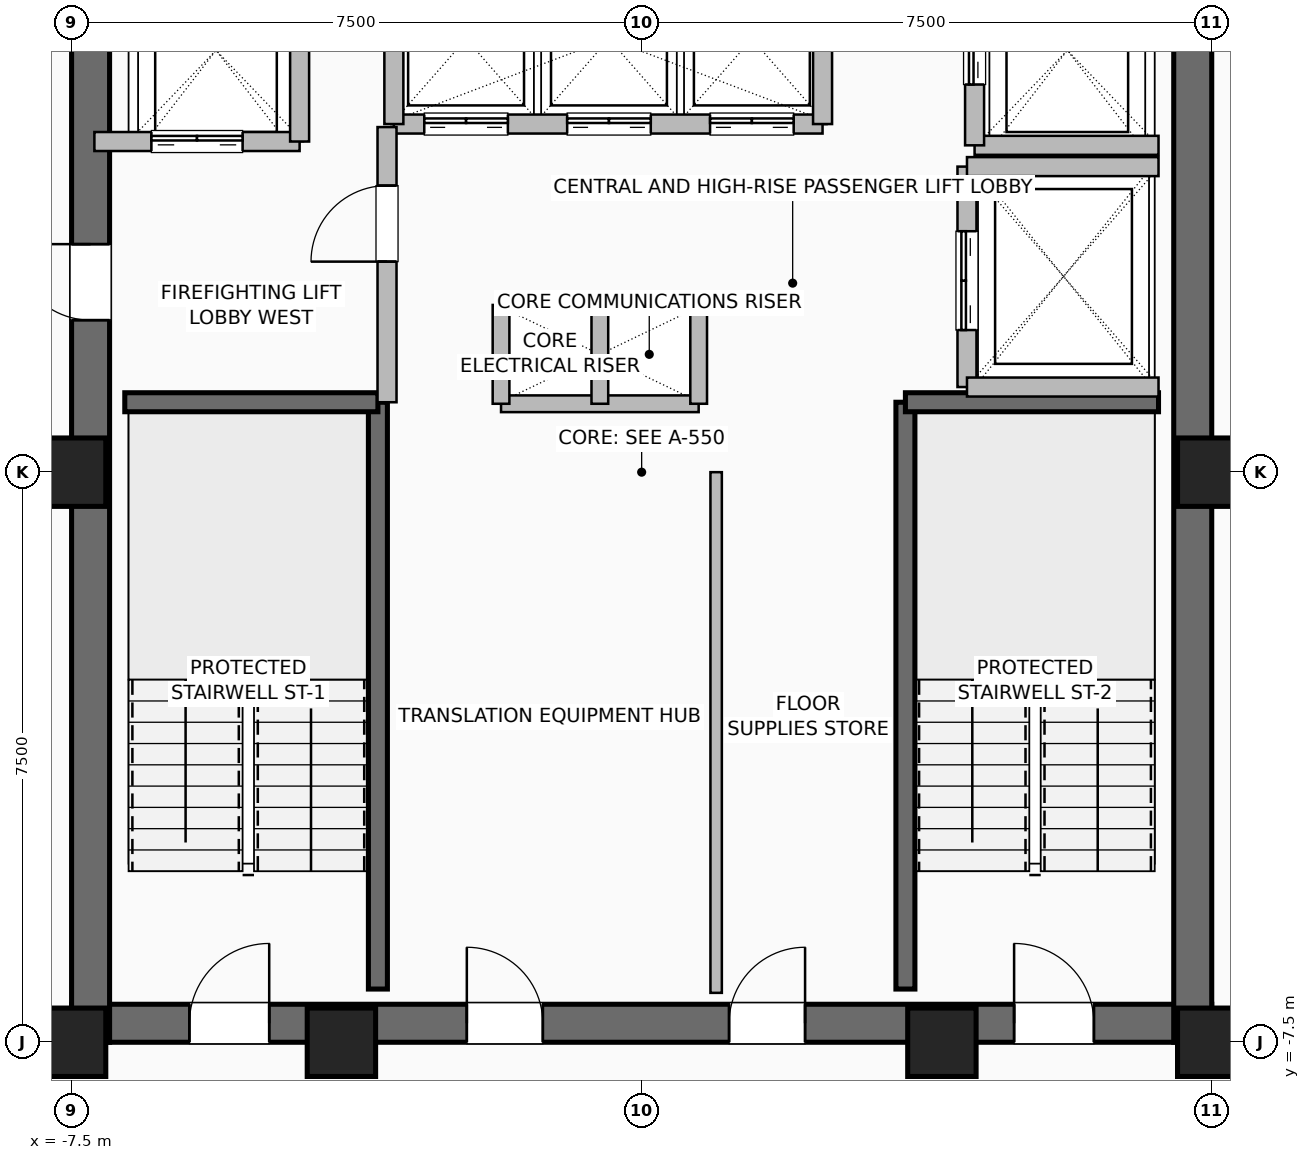
"""IFC4 building model, lengths in metres.
Left out: names, types, materials, properties, quantities, classifications, styles, units other than length and angle.
Written with IfcOpenShell. Run it as: python <this file> out.ifc"""

import sys

from ifc_helpers import new_model, si_unit, direction, frame, frame_2d, origin, origin_2d, place, context, subcontext, project, spatial, rectangle, hollow_rectangle, extrude, element, fill, save


model = new_model("IFC4")
c1 = context("Model", 3, precision=1e-05, world=origin(), true_north=direction((0.0, 1.0)))
c2 = subcontext(c1, "Body", "Model", "MODEL_VIEW")
j1 = project(units=[si_unit("LENGTHUNIT", "METRE"), si_unit("PLANEANGLEUNIT", "RADIAN")], contexts=[c1])
p1 = place(None, origin())
s1 = spatial("IfcSite", under=j1, at=p1, CompositionType="ELEMENT")
p2 = place(p1, origin())
s2 = spatial("IfcBuilding", under=s1, at=p2, CompositionType="ELEMENT")
p3 = place(p2, frame((0.0, 0.0, 195.0)))
s3 = spatial("IfcBuildingStorey", under=s2, at=p3, CompositionType="ELEMENT", Elevation=195.0)
for number, where, z_axis, x_axis in (
    (1, (-7.5, -7.5, 0.0), (0.0, 0.0, 1.0), (1.0, 0.0, 0.0)),
    (2, (-3.95, -7.5, 0.0), (0.0, 0.0, 1.0), (1.0, 0.0, 0.0)),
    (3, (3.95, -7.5, 0.0), (0.0, 0.0, 1.0), (1.0, 0.0, 0.0)),
    (4, (7.5, -7.5, 0.0), (0.0, 0.0, 1.0), (1.0, 0.0, 0.0)),
    (5, (7.5, 0.0, 0.0), (0.0, 0.0, 1.0), (1.0, 0.0, 0.0)),
    (6, (-7.5, 0.0, 0.0), (0.0, 0.0, 1.0), (1.0, 0.0, 0.0)),
):
    element("IfcColumn", number, at=place(p3, frame(where, z_axis=z_axis, x_axis=x_axis)), inside=s3, PredefinedType="COLUMN", context=c2, shape_type="SweptSolid", body=[
        extrude(hollow_rectangle(XDim=0.9, YDim=0.9, WallThickness=0.045, at=origin_2d()), origin(), (0.0, 0.0, 1.0), 3.6),
    ])
p4 = place(p3, frame((-7.5, -7.25, 0.0), z_axis=(0.0, 0.0, 1.0), x_axis=(1.0, 0.0, 0.0)))
e7 = element("IfcWall", 7, at=p4, inside=s3, PredefinedType="SHEAR", context=c2, shape_type="SweptSolid", body=[
    extrude(rectangle(XDim=15.0, YDim=0.5, at=frame_2d((7.5, 0.0))), origin(), (0.0, 0.0, 1.0), 3.36),
])
p5 = place(p4, frame((1.55, 0.0, 0.0)))
e8 = element("IfcOpeningElement", 8, at=p5, cuts=e7, PredefinedType="OPENING", context=c2, shape_type="SweptSolid", body=[
    extrude(rectangle(XDim=1.05, YDim=2.08, at=frame_2d((0.525, 1.04))), frame((0.0, 0.26, 0.0), z_axis=(0.0, -1.0, 0.0), x_axis=(1.0, 0.0, 0.0)), (0.0, 0.0, 1.0), 0.52),
])
p6 = place(p4, frame((12.4, 0.0, 0.0)))
e9 = element("IfcOpeningElement", 9, at=p6, cuts=e7, PredefinedType="OPENING", context=c2, shape_type="SweptSolid", body=[
    extrude(rectangle(XDim=1.05, YDim=2.08, at=frame_2d((0.525, 1.04))), frame((0.0, 0.26, 0.0), z_axis=(0.0, -1.0, 0.0), x_axis=(1.0, 0.0, 0.0)), (0.0, 0.0, 1.0), 0.52),
])
p7 = place(p4, frame((5.2, 0.0, 0.0)))
e10 = element("IfcOpeningElement", 10, at=p7, cuts=e7, PredefinedType="OPENING", context=c2, shape_type="SweptSolid", body=[
    extrude(rectangle(XDim=1.0, YDim=2.08, at=frame_2d((0.5, 1.04))), frame((0.0, 0.26, 0.0), z_axis=(0.0, -1.0, 0.0), x_axis=(1.0, 0.0, 0.0)), (0.0, 0.0, 1.0), 0.52),
])
p8 = place(p4, frame((8.65, 0.0, 0.0)))
e11 = element("IfcOpeningElement", 11, at=p8, cuts=e7, PredefinedType="OPENING", context=c2, shape_type="SweptSolid", body=[
    extrude(rectangle(XDim=1.0, YDim=2.08, at=frame_2d((0.5, 1.04))), frame((0.0, 0.26, 0.0), z_axis=(0.0, -1.0, 0.0), x_axis=(1.0, 0.0, 0.0)), (0.0, 0.0, 1.0), 0.52),
])
p9 = place(p3, frame((-7.25, -7.5, 0.0), z_axis=(0.0, 0.0, 1.0), x_axis=(0.0, 1.0, 0.0)))
e12 = element("IfcWall", 12, at=p9, inside=s3, PredefinedType="SHEAR", context=c2, shape_type="SweptSolid", body=[
    extrude(rectangle(XDim=15.0, YDim=0.5, at=frame_2d((7.5, 0.0))), origin(), (0.0, 0.0, 1.0), 3.36),
])
p10 = place(p9, frame((9.5, 0.0, 0.0)))
e13 = element("IfcOpeningElement", 13, at=p10, cuts=e12, PredefinedType="OPENING", context=c2, shape_type="SweptSolid", body=[
    extrude(rectangle(XDim=1.0, YDim=2.08, at=frame_2d((0.5, 1.04))), frame((0.0, 0.26, 0.0), z_axis=(0.0, -1.0, 0.0), x_axis=(1.0, 0.0, 0.0)), (0.0, 0.0, 1.0), 0.52),
])
p11 = place(p3, frame((7.25, -7.5, 0.0), z_axis=(0.0, 0.0, 1.0), x_axis=(0.0, 1.0, 0.0)))
e14 = element("IfcWall", 14, at=p11, inside=s3, PredefinedType="SHEAR", context=c2, shape_type="SweptSolid", body=[
    extrude(rectangle(XDim=15.0, YDim=0.5, at=frame_2d((7.5, 0.0))), origin(), (0.0, 0.0, 1.0), 3.36),
])
p12 = place(p3, frame((-3.47, -6.8, 0.0), z_axis=(0.0, 0.0, 1.0), x_axis=(0.0, 1.0, 0.0)))
e15 = element("IfcWall", 15, at=p12, inside=s3, PredefinedType="SHEAR", context=c2, shape_type="SweptSolid", body=[
    extrude(rectangle(XDim=7.72, YDim=0.25, at=frame_2d((3.86, 0.0))), origin(), (0.0, 0.0, 1.0), 3.36),
])
p13 = place(p3, frame((-6.8, 0.92, 0.0), z_axis=(0.0, 0.0, 1.0), x_axis=(1.0, 0.0, 0.0)))
e16 = element("IfcWall", 16, at=p13, inside=s3, PredefinedType="SHEAR", context=c2, shape_type="SweptSolid", body=[
    extrude(rectangle(XDim=3.33, YDim=0.25, at=frame_2d((1.665, 0.0))), origin(), (0.0, 0.0, 1.0), 3.36),
])
p14 = place(p3, frame((3.47, -6.8, 0.0), z_axis=(0.0, 0.0, 1.0), x_axis=(0.0, 1.0, 0.0)))
e17 = element("IfcWall", 17, at=p14, inside=s3, PredefinedType="SHEAR", context=c2, shape_type="SweptSolid", body=[
    extrude(rectangle(XDim=7.72, YDim=0.25, at=frame_2d((3.86, 0.0))), origin(), (0.0, 0.0, 1.0), 3.36),
])
p15 = place(p3, frame((3.47, 0.92, 0.0), z_axis=(0.0, 0.0, 1.0), x_axis=(1.0, 0.0, 0.0)))
e18 = element("IfcWall", 18, at=p15, inside=s3, PredefinedType="SHEAR", context=c2, shape_type="SweptSolid", body=[
    extrude(rectangle(XDim=3.33, YDim=0.25, at=frame_2d((1.665, 0.0))), origin(), (0.0, 0.0, 1.0), 3.36),
])
for number, where, z_axis, x_axis in (
    (19, (-1.85, 2.2, 0.0), (0.0, 0.0, 1.0), (1.0, 0.0, 0.0)),
    (20, (-1.85, 0.9, 0.0), (0.0, 0.0, 1.0), (1.0, 0.0, 0.0)),
):
    element("IfcWall", number, at=place(p3, frame(where, z_axis=z_axis, x_axis=x_axis)), inside=s3, PredefinedType="PARTITIONING", context=c2, shape_type="SweptSolid", body=[
        extrude(rectangle(XDim=2.6, YDim=0.22, at=frame_2d((1.3, 0.0))), origin(), (0.0, 0.0, 1.0), 3.36),
    ])
for number, where, z_axis, x_axis in (
    (21, (-0.55, 0.9, 0.0), (0.0, 0.0, 1.0), (0.0, 1.0, 0.0)),
    (22, (0.75, 0.9, 0.0), (0.0, 0.0, 1.0), (0.0, 1.0, 0.0)),
    (23, (-1.85, 0.9, 0.0), (0.0, 0.0, 1.0), (0.0, 1.0, 0.0)),
):
    element("IfcWall", number, at=place(p3, frame(where, z_axis=z_axis, x_axis=x_axis)), inside=s3, PredefinedType="PARTITIONING", context=c2, shape_type="SweptSolid", body=[
        extrude(rectangle(XDim=1.3, YDim=0.22, at=frame_2d((0.65, 0.0))), origin(), (0.0, 0.0, 1.0), 3.36),
    ])
p16 = place(p3, frame((-3.26, 4.58, 0.0), z_axis=(0.0, 0.0, 1.0), x_axis=(1.0, 0.0, 0.0)))
e24 = element("IfcWall", 24, at=p16, inside=s3, PredefinedType="SHEAR", context=c2, shape_type="SweptSolid", body=[
    extrude(rectangle(XDim=5.64, YDim=0.25, at=frame_2d((2.82, 0.0))), origin(), (0.0, 0.0, 1.0), 3.36),
])
p17 = place(p16, frame((0.4, 0.0, 0.0)))
e25 = element("IfcOpeningElement", 25, at=p17, cuts=e24, PredefinedType="OPENING", context=c2, shape_type="SweptSolid", body=[
    extrude(rectangle(XDim=1.1, YDim=2.2, at=frame_2d((0.55, 1.1))), frame((0.0, 0.135, 0.0), z_axis=(0.0, -1.0, 0.0), x_axis=(1.0, 0.0, 0.0)), (0.0, 0.0, 1.0), 0.27),
])
p18 = place(p16, frame((2.28, 0.0, 0.0)))
e26 = element("IfcOpeningElement", 26, at=p18, cuts=e24, PredefinedType="OPENING", context=c2, shape_type="SweptSolid", body=[
    extrude(rectangle(XDim=1.1, YDim=2.2, at=frame_2d((0.55, 1.1))), frame((0.0, 0.135, 0.0), z_axis=(0.0, -1.0, 0.0), x_axis=(1.0, 0.0, 0.0)), (0.0, 0.0, 1.0), 0.27),
])
p19 = place(p16, frame((4.16, 0.0, 0.0)))
e27 = element("IfcOpeningElement", 27, at=p19, cuts=e24, PredefinedType="OPENING", context=c2, shape_type="SweptSolid", body=[
    extrude(rectangle(XDim=1.1, YDim=2.2, at=frame_2d((0.55, 1.1))), frame((0.0, 0.135, 0.0), z_axis=(0.0, -1.0, 0.0), x_axis=(1.0, 0.0, 0.0)), (0.0, 0.0, 1.0), 0.27),
])
for number, where, z_axis, x_axis in (
    (28, (-3.26, 4.58, 0.0), (0.0, 0.0, 1.0), (0.0, 1.0, 0.0)),
    (29, (2.38, 4.58, 0.0), (0.0, 0.0, 1.0), (0.0, 1.0, 0.0)),
):
    element("IfcWall", number, at=place(p3, frame(where, z_axis=z_axis, x_axis=x_axis)), inside=s3, PredefinedType="SHEAR", context=c2, shape_type="SweptSolid", body=[
        extrude(rectangle(XDim=2.22, YDim=0.25, at=frame_2d((1.11, 0.0))), origin(), (0.0, 0.0, 1.0), 3.36),
    ])
p20 = place(p3, frame((-7.2, 4.35, 0.0), z_axis=(0.0, 0.0, 1.0), x_axis=(1.0, 0.0, 0.0)))
e30 = element("IfcWall", 30, at=p20, inside=s3, PredefinedType="SHEAR", context=c2, shape_type="SweptSolid", body=[
    extrude(rectangle(XDim=2.7, YDim=0.25, at=frame_2d((1.35, 0.0))), origin(), (0.0, 0.0, 1.0), 3.36),
])
p21 = place(p20, frame((0.75, 0.0, 0.0)))
e31 = element("IfcOpeningElement", 31, at=p21, cuts=e30, PredefinedType="OPENING", context=c2, shape_type="SweptSolid", body=[
    extrude(rectangle(XDim=1.2, YDim=2.2, at=frame_2d((0.6, 1.1))), frame((0.0, 0.135, 0.0), z_axis=(0.0, -1.0, 0.0), x_axis=(1.0, 0.0, 0.0)), (0.0, 0.0, 1.0), 0.27),
])
p22 = place(p3, frame((-4.5, 4.35, 0.0), z_axis=(0.0, 0.0, 1.0), x_axis=(0.0, 1.0, 0.0)))
e32 = element("IfcWall", 32, at=p22, inside=s3, PredefinedType="SHEAR", context=c2, shape_type="SweptSolid", body=[
    extrude(rectangle(XDim=2.85, YDim=0.25, at=frame_2d((1.425, 0.0))), origin(), (0.0, 0.0, 1.0), 3.36),
])
p23 = place(p3, frame((4.38, 4.3, 0.0), z_axis=(0.0, 0.0, 1.0), x_axis=(1.0, 0.0, 0.0)))
e33 = element("IfcWall", 33, at=p23, inside=s3, PredefinedType="SHEAR", context=c2, shape_type="SweptSolid", body=[
    extrude(rectangle(XDim=2.42, YDim=0.25, at=frame_2d((1.21, 0.0))), origin(), (0.0, 0.0, 1.0), 3.36),
])
p24 = place(p3, frame((4.38, 4.3, 0.0), z_axis=(0.0, 0.0, 1.0), x_axis=(0.0, 1.0, 0.0)))
e34 = element("IfcWall", 34, at=p24, inside=s3, PredefinedType="SHEAR", context=c2, shape_type="SweptSolid", body=[
    extrude(rectangle(XDim=2.5, YDim=0.25, at=frame_2d((1.25, 0.0))), origin(), (0.0, 0.0, 1.0), 3.36),
])
p25 = place(p24, frame((0.8, 0.0, 0.0)))
e35 = element("IfcOpeningElement", 35, at=p25, cuts=e34, PredefinedType="OPENING", context=c2, shape_type="SweptSolid", body=[
    extrude(rectangle(XDim=1.2, YDim=2.2, at=frame_2d((0.6, 1.1))), frame((0.0, 0.135, 0.0), z_axis=(0.0, -1.0, 0.0), x_axis=(1.0, 0.0, 0.0)), (0.0, 0.0, 1.0), 0.27),
])
p26 = place(p3, frame((4.28, 1.12, 0.0), z_axis=(0.0, 0.0, 1.0), x_axis=(0.0, 1.0, 0.0)))
e36 = element("IfcWall", 36, at=p26, inside=s3, PredefinedType="SHEAR", context=c2, shape_type="SweptSolid", body=[
    extrude(rectangle(XDim=2.9, YDim=0.25, at=frame_2d((1.45, 0.0))), origin(), (0.0, 0.0, 1.0), 3.36),
])
p27 = place(p26, frame((0.75, 0.0, 0.0)))
e37 = element("IfcOpeningElement", 37, at=p27, cuts=e36, PredefinedType="OPENING", context=c2, shape_type="SweptSolid", body=[
    extrude(rectangle(XDim=1.3, YDim=2.3, at=frame_2d((0.65, 1.15))), frame((0.0, 0.135, 0.0), z_axis=(0.0, -1.0, 0.0), x_axis=(1.0, 0.0, 0.0)), (0.0, 0.0, 1.0), 0.27),
])
for number, where, z_axis, x_axis in (
    (38, (4.28, 1.12, 0.0), (0.0, 0.0, 1.0), (1.0, 0.0, 0.0)),
    (39, (4.28, 4.02, 0.0), (0.0, 0.0, 1.0), (1.0, 0.0, 0.0)),
):
    element("IfcWall", number, at=place(p3, frame(where, z_axis=z_axis, x_axis=x_axis)), inside=s3, PredefinedType="SHEAR", context=c2, shape_type="SweptSolid", body=[
        extrude(rectangle(XDim=2.52, YDim=0.25, at=frame_2d((1.26, 0.0))), origin(), (0.0, 0.0, 1.0), 3.36),
    ])
p28 = place(p3, frame((-3.35, 0.92, 0.0), z_axis=(0.0, 0.0, 1.0), x_axis=(0.0, 1.0, 0.0)))
e40 = element("IfcWall", 40, at=p28, inside=s3, PredefinedType="SHEAR", context=c2, shape_type="SweptSolid", body=[
    extrude(rectangle(XDim=3.62, YDim=0.25, at=frame_2d((1.81, 0.0))), origin(), (0.0, 0.0, 1.0), 3.36),
])
p29 = place(p28, frame((1.85, 0.0, 0.0)))
e41 = element("IfcOpeningElement", 41, at=p29, cuts=e40, PredefinedType="OPENING", context=c2, shape_type="SweptSolid", body=[
    extrude(rectangle(XDim=1.0, YDim=2.08, at=frame_2d((0.5, 1.04))), frame((0.0, 0.135, 0.0), z_axis=(0.0, -1.0, 0.0), x_axis=(1.0, 0.0, 0.0)), (0.0, 0.0, 1.0), 0.27),
])
p30 = place(p3, frame((0.98, -6.85, 0.0), z_axis=(0.0, 0.0, 1.0), x_axis=(0.0, 1.0, 0.0)))
e42 = element("IfcWall", 42, at=p30, inside=s3, PredefinedType="PARTITIONING", context=c2, shape_type="SweptSolid", body=[
    extrude(rectangle(XDim=6.85, YDim=0.15, at=frame_2d((3.425, 0.0))), origin(), (0.0, 0.0, 1.0), 3.36),
])
p31 = place(p3, frame((7.45, -7.48, 0.0), z_axis=(0.0, 0.0, 1.0), x_axis=(1.0, 0.0, 0.0)))
e43 = element("IfcWall", 43, at=p31, inside=s3, PredefinedType="PARTITIONING", context=c2, shape_type="SweptSolid", body=[
    extrude(rectangle(XDim=0.95, YDim=0.15, at=frame_2d((0.475, 0.0))), origin(), (0.0, 0.0, 1.0), 3.36),
])
p32 = place(p5, origin())
e44 = element("IfcDoor", 44, at=p32, inside=s3, OperationType="SINGLE_SWING_RIGHT", PredefinedType="DOOR", context=c2, shape_type="SweptSolid", body=[
    extrude(rectangle(XDim=1.05, YDim=2.08, at=frame_2d((0.525, 1.04))), frame((0.0, 0.025, 0.0), z_axis=(0.0, -1.0, 0.0), x_axis=(1.0, 0.0, 0.0)), (0.0, 0.0, 1.0), 0.05),
])
fill(e8, e44)
p33 = place(p6, origin())
e45 = element("IfcDoor", 45, at=p33, inside=s3, OperationType="SINGLE_SWING_LEFT", PredefinedType="DOOR", context=c2, shape_type="SweptSolid", body=[
    extrude(rectangle(XDim=1.05, YDim=2.08, at=frame_2d((0.525, 1.04))), frame((0.0, 0.025, 0.0), z_axis=(0.0, -1.0, 0.0), x_axis=(1.0, 0.0, 0.0)), (0.0, 0.0, 1.0), 0.05),
])
fill(e9, e45)
p34 = place(p10, origin())
e46 = element("IfcDoor", 46, at=p34, inside=s3, OperationType="SINGLE_SWING_RIGHT", PredefinedType="DOOR", context=c2, shape_type="SweptSolid", body=[
    extrude(rectangle(XDim=1.0, YDim=2.08, at=frame_2d((0.5, 1.04))), frame((0.0, 0.025, 0.0), z_axis=(0.0, -1.0, 0.0), x_axis=(1.0, 0.0, 0.0)), (0.0, 0.0, 1.0), 0.05),
])
fill(e13, e46)
p35 = place(p7, origin())
e47 = element("IfcDoor", 47, at=p35, inside=s3, OperationType="SINGLE_SWING_LEFT", PredefinedType="DOOR", context=c2, shape_type="SweptSolid", body=[
    extrude(rectangle(XDim=1.0, YDim=2.08, at=frame_2d((0.5, 1.04))), frame((0.0, 0.025, 0.0), z_axis=(0.0, -1.0, 0.0), x_axis=(1.0, 0.0, 0.0)), (0.0, 0.0, 1.0), 0.05),
])
fill(e10, e47)
p36 = place(p8, origin())
e48 = element("IfcDoor", 48, at=p36, inside=s3, OperationType="SINGLE_SWING_RIGHT", PredefinedType="DOOR", context=c2, shape_type="SweptSolid", body=[
    extrude(rectangle(XDim=1.0, YDim=2.08, at=frame_2d((0.5, 1.04))), frame((0.0, 0.025, 0.0), z_axis=(0.0, -1.0, 0.0), x_axis=(1.0, 0.0, 0.0)), (0.0, 0.0, 1.0), 0.05),
])
fill(e11, e48)
p37 = place(p17, origin())
e49 = element("IfcDoor", 49, at=p37, inside=s3, OperationType="DOUBLE_DOOR_SLIDING", PredefinedType="DOOR", context=c2, shape_type="SweptSolid", body=[
    extrude(rectangle(XDim=1.1, YDim=2.2, at=frame_2d((0.55, 1.1))), frame((0.0, 0.025, 0.0), z_axis=(0.0, -1.0, 0.0), x_axis=(1.0, 0.0, 0.0)), (0.0, 0.0, 1.0), 0.05),
])
fill(e25, e49)
p38 = place(p18, origin())
e50 = element("IfcDoor", 50, at=p38, inside=s3, OperationType="DOUBLE_DOOR_SLIDING", PredefinedType="DOOR", context=c2, shape_type="SweptSolid", body=[
    extrude(rectangle(XDim=1.1, YDim=2.2, at=frame_2d((0.55, 1.1))), frame((0.0, 0.025, 0.0), z_axis=(0.0, -1.0, 0.0), x_axis=(1.0, 0.0, 0.0)), (0.0, 0.0, 1.0), 0.05),
])
fill(e26, e50)
p39 = place(p19, origin())
e51 = element("IfcDoor", 51, at=p39, inside=s3, OperationType="DOUBLE_DOOR_SLIDING", PredefinedType="DOOR", context=c2, shape_type="SweptSolid", body=[
    extrude(rectangle(XDim=1.1, YDim=2.2, at=frame_2d((0.55, 1.1))), frame((0.0, 0.025, 0.0), z_axis=(0.0, -1.0, 0.0), x_axis=(1.0, 0.0, 0.0)), (0.0, 0.0, 1.0), 0.05),
])
fill(e27, e51)
p40 = place(p21, origin())
e52 = element("IfcDoor", 52, at=p40, inside=s3, OperationType="DOUBLE_DOOR_SLIDING", PredefinedType="DOOR", context=c2, shape_type="SweptSolid", body=[
    extrude(rectangle(XDim=1.2, YDim=2.2, at=frame_2d((0.6, 1.1))), frame((0.0, 0.025, 0.0), z_axis=(0.0, -1.0, 0.0), x_axis=(1.0, 0.0, 0.0)), (0.0, 0.0, 1.0), 0.05),
])
fill(e31, e52)
p41 = place(p25, origin())
e53 = element("IfcDoor", 53, at=p41, inside=s3, OperationType="DOUBLE_DOOR_SLIDING", PredefinedType="DOOR", context=c2, shape_type="SweptSolid", body=[
    extrude(rectangle(XDim=1.2, YDim=2.2, at=frame_2d((0.6, 1.1))), frame((0.0, 0.025, 0.0), z_axis=(0.0, -1.0, 0.0), x_axis=(1.0, 0.0, 0.0)), (0.0, 0.0, 1.0), 0.05),
])
fill(e35, e53)
p42 = place(p27, origin())
e54 = element("IfcDoor", 54, at=p42, inside=s3, OperationType="DOUBLE_DOOR_SLIDING", PredefinedType="DOOR", context=c2, shape_type="SweptSolid", body=[
    extrude(rectangle(XDim=1.3, YDim=2.3, at=frame_2d((0.65, 1.15))), frame((0.0, 0.025, 0.0), z_axis=(0.0, -1.0, 0.0), x_axis=(1.0, 0.0, 0.0)), (0.0, 0.0, 1.0), 0.05),
])
fill(e37, e54)
p43 = place(p29, origin())
e55 = element("IfcDoor", 55, at=p43, inside=s3, OperationType="SINGLE_SWING_LEFT", PredefinedType="DOOR", context=c2, shape_type="SweptSolid", body=[
    extrude(rectangle(XDim=1.0, YDim=2.08, at=frame_2d((0.5, 1.04))), frame((0.0, 0.025, 0.0), z_axis=(0.0, -1.0, 0.0), x_axis=(1.0, 0.0, 0.0)), (0.0, 0.0, 1.0), 0.05),
])
fill(e41, e55)
save(model, sys.argv[1])
